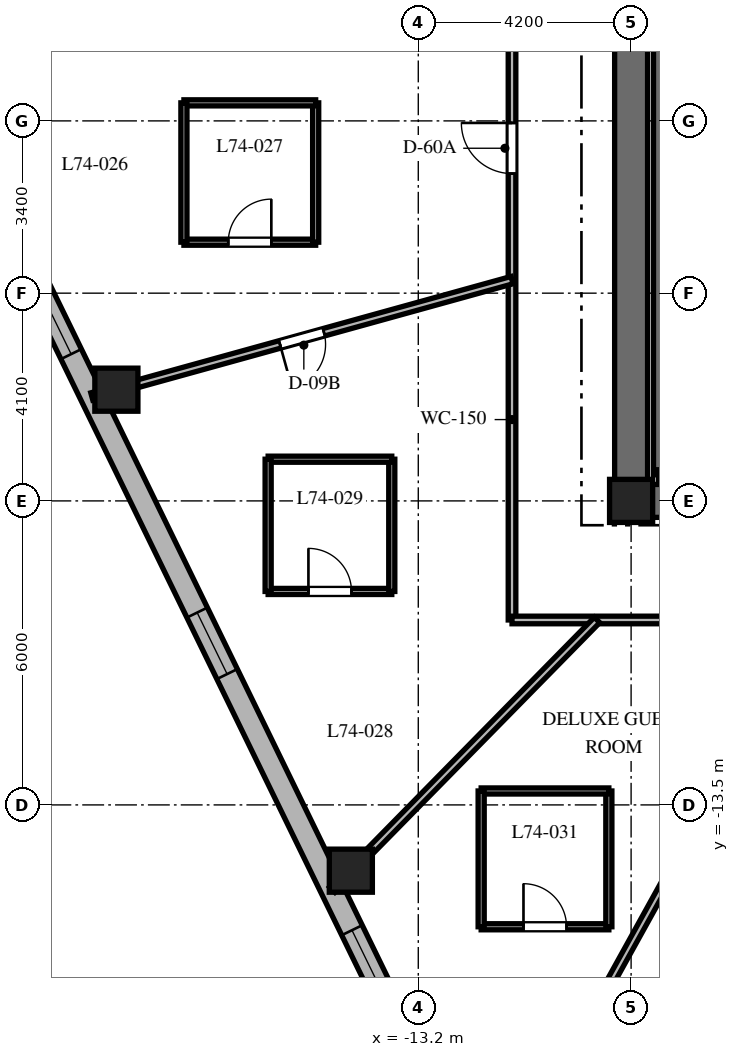
"""IFC4 building model, lengths in metres.
Left out: names, types, materials, properties, quantities, classifications, styles, units other than length and angle.
Written with IfcOpenShell. Run it as: python <this file> out.ifc"""

import sys

from ifc_helpers import new_model, si_unit, direction, frame, frame_2d, origin, origin_2d, place, context, subcontext, project, spatial, rectangle, extrude, element, fill, save


model = new_model("IFC4")
c1 = context("Model", 3, precision=1e-05, world=origin(), true_north=direction((0.0, 1.0)))
c2 = subcontext(c1, "Body", "Model", "MODEL_VIEW")
j1 = project(units=[si_unit("LENGTHUNIT", "METRE"), si_unit("PLANEANGLEUNIT", "RADIAN")], contexts=[c1])
p1 = place(None, origin())
s1 = spatial("IfcSite", under=j1, at=p1, CompositionType="ELEMENT")
p2 = place(p1, origin())
s2 = spatial("IfcBuilding", under=s1, at=p2, CompositionType="ELEMENT")
p3 = place(p2, frame((0.0, 0.0, 297.6)))
s3 = spatial("IfcBuildingStorey", under=s2, at=p3, CompositionType="ELEMENT", Elevation=297.6)
p4 = place(p3, frame((-9.325, -7.5, 0.0), z_axis=(0.0, 0.0, 1.0), x_axis=(1.0, 0.0, 0.0)))
e1 = element("IfcWall", 1, at=p4, inside=s3, PredefinedType="SHEAR", context=c2, shape_type="SweptSolid", body=[
    extrude(rectangle(XDim=18.65, YDim=0.65, at=frame_2d((9.325, 0.0))), origin(), (0.0, 0.0, 1.0), 3.9),
])
p5 = place(p4, frame((9.375, 0.0, 0.0)))
e2 = element("IfcOpeningElement", 2, at=p5, cuts=e1, PredefinedType="OPENING", context=c2, shape_type="SweptSolid", body=[
    extrude(rectangle(XDim=1.0, YDim=2.15, at=frame_2d((0.5, 1.075))), frame((0.0, 0.335, 0.0), z_axis=(0.0, -1.0, 0.0), x_axis=(1.0, 0.0, 0.0)), (0.0, 0.0, 1.0), 0.67),
])
p6 = place(p3, frame((-9.0, -7.175, 0.0), z_axis=(0.0, 0.0, 1.0), x_axis=(0.0, 1.0, 0.0)))
e3 = element("IfcWall", 3, at=p6, inside=s3, PredefinedType="SHEAR", context=c2, shape_type="SweptSolid", body=[
    extrude(rectangle(XDim=14.35, YDim=0.65, at=frame_2d((7.175, 0.0))), origin(), (0.0, 0.0, 1.0), 3.9),
])
p7 = place(p6, frame((10.3, 0.0, 0.0)))
e4 = element("IfcOpeningElement", 4, at=p7, cuts=e3, PredefinedType="OPENING", context=c2, shape_type="SweptSolid", body=[
    extrude(rectangle(XDim=1.05, YDim=2.15, at=frame_2d((0.525, 1.075))), frame((0.0, 0.335, 0.0), z_axis=(0.0, -1.0, 0.0), x_axis=(1.0, 0.0, 0.0)), (0.0, 0.0, 1.0), 0.67),
])
p8 = place(p3, frame((-8.458, -6.985, 0.0), z_axis=(0.0, 0.0, 1.0), x_axis=(0.0, 1.0, 0.0)))
e5 = element("IfcWall", 5, at=p8, inside=s3, PredefinedType="SHEAR", context=c2, shape_type="SweptSolid", body=[
    extrude(rectangle(XDim=9.143, YDim=0.2, at=frame_2d((4.572, 0.0))), origin(), (0.0, 0.0, 1.0), 3.9),
])
p9 = place(p3, frame((-8.458, -6.985, 0.0), z_axis=(0.0, 0.0, 1.0), x_axis=(1.0, 0.0, 0.0)))
e6 = element("IfcWall", 6, at=p9, inside=s3, PredefinedType="SHEAR", context=c2, shape_type="SweptSolid", body=[
    extrude(rectangle(XDim=3.686, YDim=0.2, at=frame_2d((1.843, 0.0))), origin(), (0.0, 0.0, 1.0), 3.9),
])
for number, where, z_axis, x_axis in (
    (7, (-9.0, -7.5, 0.0), (0.0, 0.0, 1.0), (1.0, 0.0, 0.0)),
    (8, (-19.158, -5.305, 0.0), (0.0, 0.0, 1.0), (1.0, 0.0, 0.0)),
    (9, (-14.531, -14.798, 0.0), (0.0, 0.0, 1.0), (1.0, 0.0, 0.0)),
):
    element("IfcColumn", number, at=place(p3, frame(where, z_axis=z_axis, x_axis=x_axis)), inside=s3, PredefinedType="COLUMN", context=c2, shape_type="SweptSolid", body=[
        extrude(rectangle(XDim=0.85, YDim=0.85, at=origin_2d()), origin(), (0.0, 0.0, 1.0), 3.9),
    ])
p10 = place(p3, frame((-15.26, 17.776, 0.0), z_axis=(0.0, 0.0, 1.0), x_axis=(-0.325407437101, -0.945573899745, 0.0)))
e10 = element("IfcWall", 10, at=p10, inside=s3, PredefinedType="SOLIDWALL", context=c2, shape_type="SweptSolid", body=[
    extrude(rectangle(XDim=18.552, YDim=0.45, at=frame_2d((9.276, 0.0))), origin(), (0.0, 0.0, 1.0), 3.6),
])
p11 = place(p10, frame((4.602, 0.0, 0.0)))
e11 = element("IfcOpeningElement", 11, at=p11, cuts=e10, PredefinedType="OPENING", context=c2, shape_type="SweptSolid", body=[
    extrude(rectangle(XDim=1.0, YDim=2.15, at=frame_2d((0.5, 1.075))), frame((0.0, 0.235, 0.0), z_axis=(0.0, -1.0, 0.0), x_axis=(1.0, 0.0, 0.0)), (0.0, 0.0, 1.0), 0.47),
])
p12 = place(p10, frame((1.161, 0.0, 0.8)))
e12 = element("IfcOpeningElement", 12, at=p12, cuts=e10, PredefinedType="OPENING", context=c2, shape_type="SweptSolid", body=[
    extrude(rectangle(XDim=1.35, YDim=1.75, at=frame_2d((0.675, 0.875))), frame((0.0, 0.235, 0.0), z_axis=(0.0, -1.0, 0.0), x_axis=(1.0, 0.0, 0.0)), (0.0, 0.0, 1.0), 0.47),
])
p13 = place(p10, frame((8.548, 0.0, 0.8)))
e13 = element("IfcOpeningElement", 13, at=p13, cuts=e10, PredefinedType="OPENING", context=c2, shape_type="SweptSolid", body=[
    extrude(rectangle(XDim=1.35, YDim=1.75, at=frame_2d((0.675, 0.875))), frame((0.0, 0.235, 0.0), z_axis=(0.0, -1.0, 0.0), x_axis=(1.0, 0.0, 0.0)), (0.0, 0.0, 1.0), 0.47),
])
p14 = place(p10, frame((15.987, 0.0, 0.8)))
e14 = element("IfcOpeningElement", 14, at=p14, cuts=e10, PredefinedType="OPENING", context=c2, shape_type="SweptSolid", body=[
    extrude(rectangle(XDim=1.35, YDim=1.75, at=frame_2d((0.675, 0.875))), frame((0.0, 0.235, 0.0), z_axis=(0.0, -1.0, 0.0), x_axis=(1.0, 0.0, 0.0)), (0.0, 0.0, 1.0), 0.47),
])
p15 = place(p3, frame((-21.138, -2.371, 0.0), z_axis=(0.0, 0.0, 1.0), x_axis=(0.438128124058, -0.89891253574, 0.0)))
e15 = element("IfcWall", 15, at=p15, inside=s3, PredefinedType="SOLIDWALL", context=c2, shape_type="SweptSolid", body=[
    extrude(rectangle(XDim=17.565, YDim=0.45, at=frame_2d((8.782, 0.0))), origin(), (0.0, 0.0, 1.0), 3.6),
])
p16 = place(p15, frame((1.133, 0.0, 0.8)))
e16 = element("IfcOpeningElement", 16, at=p16, cuts=e15, PredefinedType="OPENING", context=c2, shape_type="SweptSolid", body=[
    extrude(rectangle(XDim=1.35, YDim=1.75, at=frame_2d((0.675, 0.875))), frame((0.0, 0.235, 0.0), z_axis=(0.0, -1.0, 0.0), x_axis=(1.0, 0.0, 0.0)), (0.0, 0.0, 1.0), 0.47),
])
p17 = place(p15, frame((8.158, 0.0, 0.8)))
e17 = element("IfcOpeningElement", 17, at=p17, cuts=e15, PredefinedType="OPENING", context=c2, shape_type="SweptSolid", body=[
    extrude(rectangle(XDim=1.35, YDim=1.75, at=frame_2d((0.675, 0.875))), frame((0.0, 0.235, 0.0), z_axis=(0.0, -1.0, 0.0), x_axis=(1.0, 0.0, 0.0)), (0.0, 0.0, 1.0), 0.47),
])
p18 = place(p15, frame((15.132, 0.0, 0.8)))
e18 = element("IfcOpeningElement", 18, at=p18, cuts=e15, PredefinedType="OPENING", context=c2, shape_type="SweptSolid", body=[
    extrude(rectangle(XDim=1.35, YDim=1.75, at=frame_2d((0.675, 0.875))), frame((0.0, 0.235, 0.0), z_axis=(0.0, -1.0, 0.0), x_axis=(1.0, 0.0, 0.0)), (0.0, 0.0, 1.0), 0.47),
])
p19 = place(p3, frame((-11.35, -9.85, 0.0), z_axis=(0.0, 0.0, 1.0), x_axis=(0.0, 1.0, 0.0)))
e19 = element("IfcWall", 19, at=p19, inside=s3, PredefinedType="PARTITIONING", context=c2, shape_type="SweptSolid", body=[
    extrude(rectangle(XDim=12.4, YDim=0.15, at=frame_2d((6.2, 0.0))), origin(), (0.0, 0.0, 1.0), 2.894),
])
p20 = place(p19, frame((8.81, 0.0, 0.0)))
e20 = element("IfcOpeningElement", 20, at=p20, cuts=e19, PredefinedType="OPENING", context=c2, shape_type="SweptSolid", body=[
    extrude(rectangle(XDim=1.0, YDim=2.03, at=frame_2d((0.5, 1.015))), frame((0.0, 0.085, 0.0), z_axis=(0.0, -1.0, 0.0), x_axis=(1.0, 0.0, 0.0)), (0.0, 0.0, 1.0), 0.17),
])
p21 = place(p3, frame((-0.92, -9.85, 0.0), z_axis=(0.0, 0.0, 1.0), x_axis=(-1.0, 0.0, 0.0)))
e21 = element("IfcWall", 21, at=p21, inside=s3, PredefinedType="PARTITIONING", context=c2, shape_type="SweptSolid", body=[
    extrude(rectangle(XDim=10.43, YDim=0.15, at=frame_2d((5.215, 0.0))), origin(), (0.0, 0.0, 1.0), 2.816),
])
p22 = place(p21, frame((6.216, 0.0, 0.0)))
e22 = element("IfcOpeningElement", 22, at=p22, cuts=e21, PredefinedType="OPENING", context=c2, shape_type="SweptSolid", body=[
    extrude(rectangle(XDim=0.95, YDim=2.03, at=frame_2d((0.475, 1.015))), frame((0.0, 0.085, 0.0), z_axis=(0.0, -1.0, 0.0), x_axis=(1.0, 0.0, 0.0)), (0.0, 0.0, 1.0), 0.17),
])
p23 = place(p21, frame((2.86, 0.0, 0.0)))
e23 = element("IfcOpeningElement", 23, at=p23, cuts=e21, PredefinedType="OPENING", context=c2, shape_type="SweptSolid", body=[
    extrude(rectangle(XDim=0.9, YDim=2.03, at=frame_2d((0.45, 1.015))), frame((0.0, 0.085, 0.0), z_axis=(0.0, -1.0, 0.0), x_axis=(1.0, 0.0, 0.0)), (0.0, 0.0, 1.0), 0.17),
])
p24 = place(p3, frame((-11.35, -3.143, 0.0), z_axis=(0.0, 0.0, 1.0), x_axis=(-0.963731818141, -0.266872596386, 0.0)))
e24 = element("IfcWall", 24, at=p24, inside=s3, PredefinedType="PARTITIONING", context=c2, shape_type="SweptSolid", body=[
    extrude(rectangle(XDim=8.605, YDim=0.15, at=frame_2d((4.302, 0.0))), origin(), (0.0, 0.0, 1.0), 2.894),
])
p25 = place(p24, frame((3.852, 0.0, 0.0)))
e25 = element("IfcOpeningElement", 25, at=p25, cuts=e24, PredefinedType="OPENING", context=c2, shape_type="SweptSolid", body=[
    extrude(rectangle(XDim=0.9, YDim=2.03, at=frame_2d((0.45, 1.015))), frame((0.0, 0.085, 0.0), z_axis=(0.0, -1.0, 0.0), x_axis=(1.0, 0.0, 0.0)), (0.0, 0.0, 1.0), 0.17),
])
p26 = place(p3, frame((-9.672, -9.85, 0.0), z_axis=(0.0, 0.0, 1.0), x_axis=(-0.700629771301, -0.713524998558, 0.0)))
e26 = element("IfcWall", 26, at=p26, inside=s3, PredefinedType="PARTITIONING", context=c2, shape_type="SweptSolid", body=[
    extrude(rectangle(XDim=7.459, YDim=0.15, at=frame_2d((3.73, 0.0))), origin(), (0.0, 0.0, 1.0), 2.94),
])
p27 = place(p3, frame((-5.454, -9.85, 0.0), z_axis=(0.0, 0.0, 1.0), x_axis=(-0.48439420613, -0.874849846012, 0.0)))
e27 = element("IfcWall", 27, at=p27, inside=s3, PredefinedType="PARTITIONING", context=c2, shape_type="SweptSolid", body=[
    extrude(rectangle(XDim=11.375, YDim=0.15, at=frame_2d((5.688, 0.0))), origin(), (0.0, 0.0, 1.0), 2.94),
])
p28 = place(p3, frame((-17.825, -2.394, 0.0), z_axis=(0.0, 0.0, 1.0), x_axis=(1.0, 0.0, 0.0)))
e28 = element("IfcWall", 28, at=p28, inside=s3, PredefinedType="PARTITIONING", context=c2, shape_type="SweptSolid", body=[
    extrude(rectangle(XDim=2.6, YDim=0.12, at=frame_2d((1.3, 0.0))), origin(), (0.0, 0.0, 1.0), 3.04),
])
p29 = place(p28, frame((0.875, 0.0, 0.0)))
e29 = element("IfcOpeningElement", 29, at=p29, cuts=e28, PredefinedType="OPENING", context=c2, shape_type="SweptSolid", body=[
    extrude(rectangle(XDim=0.85, YDim=2.03, at=frame_2d((0.425, 1.015))), frame((0.0, 0.07, 0.0), z_axis=(0.0, -1.0, 0.0), x_axis=(1.0, 0.0, 0.0)), (0.0, 0.0, 1.0), 0.14),
])
p30 = place(p3, frame((-15.225, -2.394, 0.0), z_axis=(0.0, 0.0, 1.0), x_axis=(0.0, 1.0, 0.0)))
e30 = element("IfcWall", 30, at=p30, inside=s3, PredefinedType="PARTITIONING", context=c2, shape_type="SweptSolid", body=[
    extrude(rectangle(XDim=2.75, YDim=0.12, at=frame_2d((1.375, 0.0))), origin(), (0.0, 0.0, 1.0), 3.6),
])
p31 = place(p3, frame((-15.225, 0.356, 0.0), z_axis=(0.0, 0.0, 1.0), x_axis=(-1.0, 0.0, 0.0)))
e31 = element("IfcWall", 31, at=p31, inside=s3, PredefinedType="PARTITIONING", context=c2, shape_type="SweptSolid", body=[
    extrude(rectangle(XDim=2.6, YDim=0.12, at=frame_2d((1.3, 0.0))), origin(), (0.0, 0.0, 1.0), 3.04),
])
p32 = place(p3, frame((-17.825, 0.356, 0.0), z_axis=(0.0, 0.0, 1.0), x_axis=(0.0, -1.0, 0.0)))
e32 = element("IfcWall", 32, at=p32, inside=s3, PredefinedType="PARTITIONING", context=c2, shape_type="SweptSolid", body=[
    extrude(rectangle(XDim=2.75, YDim=0.12, at=frame_2d((1.375, 0.0))), origin(), (0.0, 0.0, 1.0), 3.6),
])
p33 = place(p3, frame((-16.163, -9.287, 0.0), z_axis=(0.0, 0.0, 1.0), x_axis=(1.0, 0.0, 0.0)))
e33 = element("IfcWall", 33, at=p33, inside=s3, PredefinedType="PARTITIONING", context=c2, shape_type="SweptSolid", body=[
    extrude(rectangle(XDim=2.44, YDim=0.12, at=frame_2d((1.22, 0.0))), origin(), (0.0, 0.0, 1.0), 3.126),
])
p34 = place(p33, frame((0.795, 0.0, 0.0)))
e34 = element("IfcOpeningElement", 34, at=p34, cuts=e33, PredefinedType="OPENING", context=c2, shape_type="SweptSolid", body=[
    extrude(rectangle(XDim=0.85, YDim=2.03, at=frame_2d((0.425, 1.015))), frame((0.0, 0.07, 0.0), z_axis=(0.0, -1.0, 0.0), x_axis=(1.0, 0.0, 0.0)), (0.0, 0.0, 1.0), 0.14),
])
p35 = place(p3, frame((-13.723, -9.287, 0.0), z_axis=(0.0, 0.0, 1.0), x_axis=(0.0, 1.0, 0.0)))
e35 = element("IfcWall", 35, at=p35, inside=s3, PredefinedType="PARTITIONING", context=c2, shape_type="SweptSolid", body=[
    extrude(rectangle(XDim=2.61, YDim=0.12, at=frame_2d((1.305, 0.0))), origin(), (0.0, 0.0, 1.0), 3.172),
])
p36 = place(p3, frame((-13.723, -6.677, 0.0), z_axis=(0.0, 0.0, 1.0), x_axis=(-1.0, 0.0, 0.0)))
e36 = element("IfcWall", 36, at=p36, inside=s3, PredefinedType="PARTITIONING", context=c2, shape_type="SweptSolid", body=[
    extrude(rectangle(XDim=2.44, YDim=0.12, at=frame_2d((1.22, 0.0))), origin(), (0.0, 0.0, 1.0), 3.126),
])
p37 = place(p3, frame((-16.163, -6.677, 0.0), z_axis=(0.0, 0.0, 1.0), x_axis=(0.0, -1.0, 0.0)))
e37 = element("IfcWall", 37, at=p37, inside=s3, PredefinedType="PARTITIONING", context=c2, shape_type="SweptSolid", body=[
    extrude(rectangle(XDim=2.61, YDim=0.12, at=frame_2d((1.305, 0.0))), origin(), (0.0, 0.0, 1.0), 3.6),
])
p38 = place(p3, frame((-11.959, -15.905, 0.0), z_axis=(0.0, 0.0, 1.0), x_axis=(1.0, 0.0, 0.0)))
e38 = element("IfcWall", 38, at=p38, inside=s3, PredefinedType="PARTITIONING", context=c2, shape_type="SweptSolid", body=[
    extrude(rectangle(XDim=2.52, YDim=0.12, at=frame_2d((1.26, 0.0))), origin(), (0.0, 0.0, 1.0), 3.6),
])
p39 = place(p38, frame((0.835, 0.0, 0.0)))
e39 = element("IfcOpeningElement", 39, at=p39, cuts=e38, PredefinedType="OPENING", context=c2, shape_type="SweptSolid", body=[
    extrude(rectangle(XDim=0.85, YDim=2.03, at=frame_2d((0.425, 1.015))), frame((0.0, 0.07, 0.0), z_axis=(0.0, -1.0, 0.0), x_axis=(1.0, 0.0, 0.0)), (0.0, 0.0, 1.0), 0.14),
])
p40 = place(p3, frame((-9.439, -15.905, 0.0), z_axis=(0.0, 0.0, 1.0), x_axis=(0.0, 1.0, 0.0)))
e40 = element("IfcWall", 40, at=p40, inside=s3, PredefinedType="PARTITIONING", context=c2, shape_type="SweptSolid", body=[
    extrude(rectangle(XDim=2.68, YDim=0.12, at=frame_2d((1.34, 0.0))), origin(), (0.0, 0.0, 1.0), 3.172),
])
p41 = place(p3, frame((-9.439, -13.225, 0.0), z_axis=(0.0, 0.0, 1.0), x_axis=(-1.0, 0.0, 0.0)))
e41 = element("IfcWall", 41, at=p41, inside=s3, PredefinedType="PARTITIONING", context=c2, shape_type="SweptSolid", body=[
    extrude(rectangle(XDim=2.52, YDim=0.12, at=frame_2d((1.26, 0.0))), origin(), (0.0, 0.0, 1.0), 3.172),
])
p42 = place(p3, frame((-11.959, -13.225, 0.0), z_axis=(0.0, 0.0, 1.0), x_axis=(0.0, -1.0, 0.0)))
e42 = element("IfcWall", 42, at=p42, inside=s3, PredefinedType="PARTITIONING", context=c2, shape_type="SweptSolid", body=[
    extrude(rectangle(XDim=2.68, YDim=0.12, at=frame_2d((1.34, 0.0))), origin(), (0.0, 0.0, 1.0), 3.6),
])
p43 = place(p16, origin())
e43 = element("IfcWindow", 43, at=p43, inside=s3, PartitioningType="SINGLE_PANEL", PredefinedType="WINDOW", context=c2, shape_type="SweptSolid", body=[
    extrude(rectangle(XDim=1.35, YDim=1.75, at=frame_2d((0.675, 0.875))), frame((0.0, 0.03, 0.0), z_axis=(0.0, -1.0, 0.0), x_axis=(1.0, 0.0, 0.0)), (0.0, 0.0, 1.0), 0.06),
])
fill(e16, e43)
p44 = place(p17, origin())
e44 = element("IfcWindow", 44, at=p44, inside=s3, PartitioningType="SINGLE_PANEL", PredefinedType="WINDOW", context=c2, shape_type="SweptSolid", body=[
    extrude(rectangle(XDim=1.35, YDim=1.75, at=frame_2d((0.675, 0.875))), frame((0.0, 0.03, 0.0), z_axis=(0.0, -1.0, 0.0), x_axis=(1.0, 0.0, 0.0)), (0.0, 0.0, 1.0), 0.06),
])
fill(e17, e44)
p45 = place(p18, origin())
e45 = element("IfcWindow", 45, at=p45, inside=s3, PartitioningType="SINGLE_PANEL", PredefinedType="WINDOW", context=c2, shape_type="SweptSolid", body=[
    extrude(rectangle(XDim=1.35, YDim=1.75, at=frame_2d((0.675, 0.875))), frame((0.0, 0.03, 0.0), z_axis=(0.0, -1.0, 0.0), x_axis=(1.0, 0.0, 0.0)), (0.0, 0.0, 1.0), 0.06),
])
fill(e18, e45)
p46 = place(p20, origin())
e46 = element("IfcDoor", 46, at=p46, inside=s3, OperationType="SINGLE_SWING_RIGHT", PredefinedType="DOOR", context=c2, shape_type="SweptSolid", body=[
    extrude(rectangle(XDim=1.0, YDim=2.03, at=frame_2d((0.5, 1.015))), frame((0.0, 0.025, 0.0), z_axis=(0.0, -1.0, 0.0), x_axis=(1.0, 0.0, 0.0)), (0.0, 0.0, 1.0), 0.05),
])
fill(e20, e46)
p47 = place(p25, origin())
e47 = element("IfcDoor", 47, at=p47, inside=s3, OperationType="SINGLE_SWING_RIGHT", PredefinedType="DOOR", context=c2, shape_type="SweptSolid", body=[
    extrude(rectangle(XDim=0.9, YDim=2.03, at=frame_2d((0.45, 1.015))), frame((0.0, 0.025, 0.0), z_axis=(0.0, -1.0, 0.0), x_axis=(1.0, 0.0, 0.0)), (0.0, 0.0, 1.0), 0.05),
])
fill(e25, e47)
p48 = place(p29, origin())
e48 = element("IfcDoor", 48, at=p48, inside=s3, OperationType="SINGLE_SWING_RIGHT", PredefinedType="DOOR", context=c2, shape_type="SweptSolid", body=[
    extrude(rectangle(XDim=0.85, YDim=2.03, at=frame_2d((0.425, 1.015))), frame((0.0, 0.025, 0.0), z_axis=(0.0, -1.0, 0.0), x_axis=(1.0, 0.0, 0.0)), (0.0, 0.0, 1.0), 0.05),
])
fill(e29, e48)
p49 = place(p34, origin())
e49 = element("IfcDoor", 49, at=p49, inside=s3, OperationType="SINGLE_SWING_LEFT", PredefinedType="DOOR", context=c2, shape_type="SweptSolid", body=[
    extrude(rectangle(XDim=0.85, YDim=2.03, at=frame_2d((0.425, 1.015))), frame((0.0, 0.025, 0.0), z_axis=(0.0, -1.0, 0.0), x_axis=(1.0, 0.0, 0.0)), (0.0, 0.0, 1.0), 0.05),
])
fill(e34, e49)
p50 = place(p39, origin())
e50 = element("IfcDoor", 50, at=p50, inside=s3, OperationType="SINGLE_SWING_LEFT", PredefinedType="DOOR", context=c2, shape_type="SweptSolid", body=[
    extrude(rectangle(XDim=0.85, YDim=2.03, at=frame_2d((0.425, 1.015))), frame((0.0, 0.025, 0.0), z_axis=(0.0, -1.0, 0.0), x_axis=(1.0, 0.0, 0.0)), (0.0, 0.0, 1.0), 0.05),
])
fill(e39, e50)
save(model, sys.argv[1])
